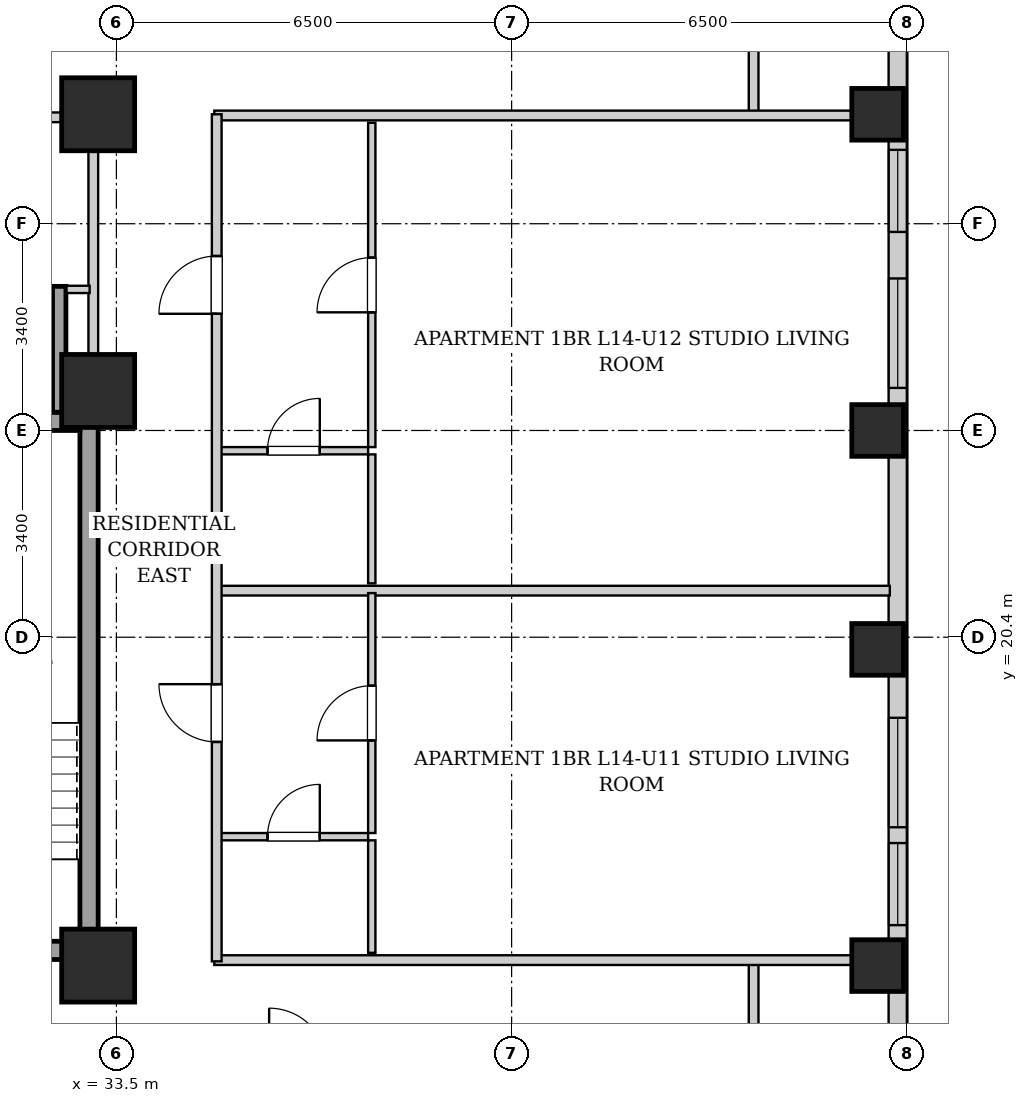
"""IFC4 building model, lengths in metres.
Left out: names, types, materials, properties, quantities, classifications, styles, units other than length and angle.
Written with IfcOpenShell. Run it as: python <this file> out.ifc"""

import sys

from ifc_helpers import new_model, si_unit, direction, frame, frame_2d, origin, origin_2d, place, context, subcontext, project, spatial, rectangle, extrude, element, fill, save


model = new_model("IFC4")
c1 = context("Model", 3, precision=1e-05, world=origin(), true_north=direction((0.0, 1.0)))
c2 = subcontext(c1, "Body", "Model", "MODEL_VIEW")
j1 = project(units=[si_unit("LENGTHUNIT", "METRE"), si_unit("PLANEANGLEUNIT", "RADIAN")], contexts=[c1])
p1 = place(None, origin())
s1 = spatial("IfcSite", under=j1, at=p1, CompositionType="ELEMENT")
p2 = place(p1, origin())
s2 = spatial("IfcBuilding", under=s1, at=p2, CompositionType="ELEMENT")
p3 = place(p2, frame((0.0, 0.0, 54.6)))
s3 = spatial("IfcBuildingStorey", under=s2, at=p3, CompositionType="ELEMENT", Elevation=54.6)
for number, where, z_axis, x_axis in (
    (1, (46.02, 15.0, 0.0), (0.0, 0.0, 1.0), (1.0, 0.0, 0.0)),
    (2, (46.02, 20.2, 0.0), (0.0, 0.0, 1.0), (1.0, 0.0, 0.0)),
    (3, (46.02, 23.8, 0.0), (0.0, 0.0, 1.0), (1.0, 0.0, 0.0)),
    (4, (46.02, 29.0, 0.0), (0.0, 0.0, 1.0), (1.0, 0.0, 0.0)),
):
    element("IfcColumn", number, at=place(p3, frame(where, z_axis=z_axis, x_axis=x_axis)), inside=s3, PredefinedType="COLUMN", context=c2, shape_type="SweptSolid", body=[
        extrude(rectangle(XDim=0.85, YDim=0.85, at=origin_2d()), origin(), (0.0, 0.0, 1.0), 3.2),
    ])
for number, where, z_axis, x_axis in (
    (5, (33.2, 15.0, 0.0), (0.0, 0.0, 1.0), (1.0, 0.0, 0.0)),
    (6, (33.2, 29.0, 0.0), (0.0, 0.0, 1.0), (1.0, 0.0, 0.0)),
    (7, (33.2, 24.45, 0.0), (0.0, 0.0, 1.0), (1.0, 0.0, 0.0)),
):
    element("IfcColumn", number, at=place(p3, frame(where, z_axis=z_axis, x_axis=x_axis)), inside=s3, PredefinedType="COLUMN", context=c2, shape_type="SweptSolid", body=[
        extrude(rectangle(XDim=1.2, YDim=1.2, at=origin_2d()), origin(), (0.0, 0.0, 1.0), 3.2),
    ])
p4 = place(p3, frame((46.35, 45.1, 0.0), z_axis=(0.0, 0.0, 1.0), x_axis=(0.0, -1.0, 0.0)))
e8 = element("IfcWall", 8, at=p4, inside=s3, PredefinedType="SOLIDWALL", context=c2, shape_type="SweptSolid", body=[
    extrude(rectangle(XDim=42.6, YDim=0.3, at=frame_2d((21.3, 0.0))), origin(), (0.0, 0.0, 1.0), 1.975),
])
p5 = place(p4, frame((37.575, 0.0, 0.55)))
e9 = element("IfcOpeningElement", 9, at=p5, cuts=e8, PredefinedType="OPENING", context=c2, shape_type="SweptSolid", body=[
    extrude(rectangle(XDim=1.8, YDim=1.2, at=frame_2d((0.9, 0.6))), frame((0.0, 0.16, 0.0), z_axis=(0.0, -1.0, 0.0), x_axis=(1.0, 0.0, 0.0)), (0.0, 0.0, 1.0), 0.32),
])
p6 = place(p4, frame((34.85, 0.0, 0.55)))
e10 = element("IfcOpeningElement", 10, at=p6, cuts=e8, PredefinedType="OPENING", context=c2, shape_type="SweptSolid", body=[
    extrude(rectangle(XDim=1.35, YDim=1.2, at=frame_2d((0.675, 0.6))), frame((0.0, 0.16, 0.0), z_axis=(0.0, -1.0, 0.0), x_axis=(1.0, 0.0, 0.0)), (0.0, 0.0, 1.0), 0.32),
])
p7 = place(p4, frame((3.715, 0.0, 0.55)))
e11 = element("IfcOpeningElement", 11, at=p7, cuts=e8, PredefinedType="OPENING", context=c2, shape_type="SweptSolid", body=[
    extrude(rectangle(XDim=1.8, YDim=1.2, at=frame_2d((0.9, 0.6))), frame((0.0, 0.16, 0.0), z_axis=(0.0, -1.0, 0.0), x_axis=(1.0, 0.0, 0.0)), (0.0, 0.0, 1.0), 0.32),
])
p8 = place(p4, frame((1.185, 0.0, 0.55)))
e12 = element("IfcOpeningElement", 12, at=p8, cuts=e8, PredefinedType="OPENING", context=c2, shape_type="SweptSolid", body=[
    extrude(rectangle(XDim=1.35, YDim=1.2, at=frame_2d((0.675, 0.6))), frame((0.0, 0.16, 0.0), z_axis=(0.0, -1.0, 0.0), x_axis=(1.0, 0.0, 0.0)), (0.0, 0.0, 1.0), 0.32),
])
p9 = place(p4, frame((26.025, 0.0, 0.55)))
e13 = element("IfcOpeningElement", 13, at=p9, cuts=e8, PredefinedType="OPENING", context=c2, shape_type="SweptSolid", body=[
    extrude(rectangle(XDim=1.8, YDim=1.2, at=frame_2d((0.9, 0.6))), frame((0.0, 0.16, 0.0), z_axis=(0.0, -1.0, 0.0), x_axis=(1.0, 0.0, 0.0)), (0.0, 0.0, 1.0), 0.32),
])
p10 = place(p4, frame((28.085, 0.0, 0.55)))
e14 = element("IfcOpeningElement", 14, at=p10, cuts=e8, PredefinedType="OPENING", context=c2, shape_type="SweptSolid", body=[
    extrude(rectangle(XDim=1.35, YDim=1.2, at=frame_2d((0.675, 0.6))), frame((0.0, 0.16, 0.0), z_axis=(0.0, -1.0, 0.0), x_axis=(1.0, 0.0, 0.0)), (0.0, 0.0, 1.0), 0.32),
])
p11 = place(p4, frame((18.8, 0.0, 0.55)))
e15 = element("IfcOpeningElement", 15, at=p11, cuts=e8, PredefinedType="OPENING", context=c2, shape_type="SweptSolid", body=[
    extrude(rectangle(XDim=1.8, YDim=1.2, at=frame_2d((0.9, 0.6))), frame((0.0, 0.16, 0.0), z_axis=(0.0, -1.0, 0.0), x_axis=(1.0, 0.0, 0.0)), (0.0, 0.0, 1.0), 0.32),
])
p12 = place(p4, frame((16.685, 0.0, 0.55)))
e16 = element("IfcOpeningElement", 16, at=p12, cuts=e8, PredefinedType="OPENING", context=c2, shape_type="SweptSolid", body=[
    extrude(rectangle(XDim=1.35, YDim=1.2, at=frame_2d((0.675, 0.6))), frame((0.0, 0.16, 0.0), z_axis=(0.0, -1.0, 0.0), x_axis=(1.0, 0.0, 0.0)), (0.0, 0.0, 1.0), 0.32),
])
p13 = place(p3, frame((33.05, 15.1, 0.0), z_axis=(0.0, 0.0, 1.0), x_axis=(0.0, 1.0, 0.0)))
e17 = element("IfcWall", 17, at=p13, inside=s3, PredefinedType="SHEAR", context=c2, shape_type="SweptSolid", body=[
    extrude(rectangle(XDim=9.0, YDim=0.3, at=frame_2d((4.5, 0.0))), origin(), (0.0, 0.0, 1.0), 2.94),
])
p14 = place(p3, frame((30.05, 23.95, 0.0), z_axis=(0.0, 0.0, 1.0), x_axis=(1.0, 0.0, 0.0)))
e18 = element("IfcWall", 18, at=p14, inside=s3, PredefinedType="SHEAR", context=c2, shape_type="SweptSolid", body=[
    extrude(rectangle(XDim=2.85, YDim=0.3, at=frame_2d((1.425, 0.0))), origin(), (0.0, 0.0, 1.0), 2.94),
])
p15 = place(p3, frame((30.05, 15.25, 0.0), z_axis=(0.0, 0.0, 1.0), x_axis=(1.0, 0.0, 0.0)))
e19 = element("IfcWall", 19, at=p15, inside=s3, PredefinedType="SHEAR", context=c2, shape_type="SweptSolid", body=[
    extrude(rectangle(XDim=2.85, YDim=0.3, at=frame_2d((1.425, 0.0))), origin(), (0.0, 0.0, 1.0), 2.94),
])
p16 = place(p15, frame((0.86, 0.0, 0.0)))
e20 = element("IfcOpeningElement", 20, at=p16, cuts=e19, PredefinedType="OPENING", context=c2, shape_type="SweptSolid", body=[
    extrude(rectangle(XDim=1.1, YDim=2.05, at=frame_2d((0.55, 1.025))), frame((0.0, 0.16, 0.0), z_axis=(0.0, -1.0, 0.0), x_axis=(1.0, 0.0, 0.0)), (0.0, 0.0, 1.0), 0.32),
])
p17 = place(p3, frame((32.56, 24.1, 0.0), z_axis=(0.0, 0.0, 1.0), x_axis=(0.0, 1.0, 0.0)))
e21 = element("IfcWall", 21, at=p17, inside=s3, PredefinedType="SHEAR", context=c2, shape_type="SweptSolid", body=[
    extrude(rectangle(XDim=2.07, YDim=0.22, at=frame_2d((1.035, 0.0))), origin(), (0.0, 0.0, 1.0), 2.94),
])
p18 = place(p3, frame((33.12, 24.12, 0.0), z_axis=(0.0, 0.0, 1.0), x_axis=(0.0, 1.0, 0.0)))
e22 = element("IfcWall", 22, at=p18, inside=s3, PredefinedType="PARTITIONING", context=c2, shape_type="SweptSolid", body=[
    extrude(rectangle(XDim=4.76, YDim=0.16, at=frame_2d((2.38, 0.0))), origin(), (0.0, 0.0, 1.0), 2.94),
])
p19 = place(p3, frame((32.68, 26.12, 0.0), z_axis=(0.0, 0.0, 1.0), x_axis=(1.0, 0.0, 0.0)))
e23 = element("IfcWall", 23, at=p19, inside=s3, PredefinedType="PARTITIONING", context=c2, shape_type="SweptSolid", body=[
    extrude(rectangle(XDim=0.38, YDim=0.12, at=frame_2d((0.19, 0.0))), origin(), (0.0, 0.0, 1.0), 2.94),
])
p20 = place(p3, frame((30.08, 28.95, 0.0), z_axis=(0.0, 0.0, 1.0), x_axis=(1.0, 0.0, 0.0)))
e24 = element("IfcWall", 24, at=p20, inside=s3, PredefinedType="PARTITIONING", context=c2, shape_type="SweptSolid", body=[
    extrude(rectangle(XDim=2.96, YDim=0.16, at=frame_2d((1.48, 0.0))), origin(), (0.0, 0.0, 1.0), 2.94),
])
p21 = place(p20, frame((0.695, 0.0, 0.0)))
e25 = element("IfcOpeningElement", 25, at=p21, cuts=e24, PredefinedType="OPENING", context=c2, shape_type="SweptSolid", body=[
    extrude(rectangle(XDim=0.86, YDim=2.05, at=frame_2d((0.43, 1.025))), frame((0.0, 0.09, 0.0), z_axis=(0.0, -1.0, 0.0), x_axis=(1.0, 0.0, 0.0)), (0.0, 0.0, 1.0), 0.18),
])
for number, where, z_axis, x_axis in (
    (26, (43.98, 13.35, 0.0), (0.0, 0.0, 1.0), (0.0, 1.0, 0.0)),
    (27, (43.98, 28.98, 0.0), (0.0, 0.0, 1.0), (0.0, 1.0, 0.0)),
):
    element("IfcWall", number, at=place(p3, frame(where, z_axis=z_axis, x_axis=x_axis)), inside=s3, PredefinedType="PARTITIONING", context=c2, shape_type="SweptSolid", body=[
        extrude(rectangle(XDim=1.74, YDim=0.16, at=frame_2d((0.87, 0.0))), origin(), (0.0, 0.0, 1.0), 2.94),
    ])
for number, where, z_axis, x_axis in (
    (28, (35.11, 15.09, 0.0), (0.0, 0.0, 1.0), (1.0, 0.0, 0.0)),
    (29, (35.11, 28.98, 0.0), (0.0, 0.0, 1.0), (1.0, 0.0, 0.0)),
):
    element("IfcWall", number, at=place(p3, frame(where, z_axis=z_axis, x_axis=x_axis)), inside=s3, PredefinedType="PARTITIONING", context=c2, shape_type="SweptSolid", body=[
        extrude(rectangle(XDim=11.11, YDim=0.16, at=frame_2d((5.555, 0.0))), origin(), (0.0, 0.0, 1.0), 2.232),
    ])
p22 = place(p3, frame((35.19, 21.166, 0.0), z_axis=(0.0, 0.0, 1.0), x_axis=(1.0, 0.0, 0.0)))
e30 = element("IfcWall", 30, at=p22, inside=s3, PredefinedType="PARTITIONING", context=c2, shape_type="SweptSolid", body=[
    extrude(rectangle(XDim=11.03, YDim=0.16, at=frame_2d((5.515, 0.0))), origin(), (0.0, 0.0, 1.0), 2.94),
])
p23 = place(p3, frame((35.19, 17.12, 0.0), z_axis=(0.0, 0.0, 1.0), x_axis=(1.0, 0.0, 0.0)))
e31 = element("IfcWall", 31, at=p23, inside=s3, PredefinedType="PARTITIONING", context=c2, shape_type="SweptSolid", body=[
    extrude(rectangle(XDim=2.45, YDim=0.12, at=frame_2d((1.225, 0.0))), origin(), (0.0, 0.0, 1.0), 2.94),
])
p24 = place(p23, frame((0.795, 0.0, 0.0)))
e32 = element("IfcOpeningElement", 32, at=p24, cuts=e31, PredefinedType="OPENING", context=c2, shape_type="SweptSolid", body=[
    extrude(rectangle(XDim=0.86, YDim=2.05, at=frame_2d((0.43, 1.025))), frame((0.0, 0.07, 0.0), z_axis=(0.0, -1.0, 0.0), x_axis=(1.0, 0.0, 0.0)), (0.0, 0.0, 1.0), 0.14),
])
p25 = place(p3, frame((37.7, 15.21, 0.0), z_axis=(0.0, 0.0, 1.0), x_axis=(0.0, 1.0, 0.0)))
e33 = element("IfcWall", 33, at=p25, inside=s3, PredefinedType="PARTITIONING", context=c2, shape_type="SweptSolid", body=[
    extrude(rectangle(XDim=1.85, YDim=0.12, at=frame_2d((0.925, 0.0))), origin(), (0.0, 0.0, 1.0), 2.94),
])
p26 = place(p3, frame((37.7, 17.18, 0.0), z_axis=(0.0, 0.0, 1.0), x_axis=(0.0, 1.0, 0.0)))
e34 = element("IfcWall", 34, at=p26, inside=s3, PredefinedType="PARTITIONING", context=c2, shape_type="SweptSolid", body=[
    extrude(rectangle(XDim=3.946, YDim=0.12, at=frame_2d((1.973, 0.0))), origin(), (0.0, 0.0, 1.0), 2.94),
])
p27 = place(p26, frame((1.523, 0.0, 0.0)))
e35 = element("IfcOpeningElement", 35, at=p27, cuts=e34, PredefinedType="OPENING", context=c2, shape_type="SweptSolid", body=[
    extrude(rectangle(XDim=0.9, YDim=2.05, at=frame_2d((0.45, 1.025))), frame((0.0, 0.07, 0.0), z_axis=(0.0, -1.0, 0.0), x_axis=(1.0, 0.0, 0.0)), (0.0, 0.0, 1.0), 0.14),
])
p28 = place(p3, frame((35.19, 23.467, 0.0), z_axis=(0.0, 0.0, 1.0), x_axis=(1.0, 0.0, 0.0)))
e36 = element("IfcWall", 36, at=p28, inside=s3, PredefinedType="PARTITIONING", context=c2, shape_type="SweptSolid", body=[
    extrude(rectangle(XDim=2.45, YDim=0.12, at=frame_2d((1.225, 0.0))), origin(), (0.0, 0.0, 1.0), 2.94),
])
p29 = place(p28, frame((0.795, 0.0, 0.0)))
e37 = element("IfcOpeningElement", 37, at=p29, cuts=e36, PredefinedType="OPENING", context=c2, shape_type="SweptSolid", body=[
    extrude(rectangle(XDim=0.86, YDim=2.05, at=frame_2d((0.43, 1.025))), frame((0.0, 0.07, 0.0), z_axis=(0.0, -1.0, 0.0), x_axis=(1.0, 0.0, 0.0)), (0.0, 0.0, 1.0), 0.14),
])
p30 = place(p3, frame((37.7, 21.286, 0.0), z_axis=(0.0, 0.0, 1.0), x_axis=(0.0, 1.0, 0.0)))
e38 = element("IfcWall", 38, at=p30, inside=s3, PredefinedType="PARTITIONING", context=c2, shape_type="SweptSolid", body=[
    extrude(rectangle(XDim=2.121, YDim=0.12, at=frame_2d((1.061, 0.0))), origin(), (0.0, 0.0, 1.0), 2.94),
])
p31 = place(p3, frame((37.7, 23.527, 0.0), z_axis=(0.0, 0.0, 1.0), x_axis=(0.0, 1.0, 0.0)))
e39 = element("IfcWall", 39, at=p31, inside=s3, PredefinedType="PARTITIONING", context=c2, shape_type="SweptSolid", body=[
    extrude(rectangle(XDim=5.333, YDim=0.12, at=frame_2d((2.667, 0.0))), origin(), (0.0, 0.0, 1.0), 2.94),
])
p32 = place(p31, frame((2.216, 0.0, 0.0)))
e40 = element("IfcOpeningElement", 40, at=p32, cuts=e39, PredefinedType="OPENING", context=c2, shape_type="SweptSolid", body=[
    extrude(rectangle(XDim=0.9, YDim=2.05, at=frame_2d((0.45, 1.025))), frame((0.0, 0.07, 0.0), z_axis=(0.0, -1.0, 0.0), x_axis=(1.0, 0.0, 0.0)), (0.0, 0.0, 1.0), 0.14),
])
p33 = place(p3, frame((35.15, 15.07, 0.0), z_axis=(0.0, 0.0, 1.0), x_axis=(0.0, 1.0, 0.0)))
e41 = element("IfcWall", 41, at=p33, inside=s3, PredefinedType="PARTITIONING", context=c2, shape_type="SweptSolid", body=[
    extrude(rectangle(XDim=13.93, YDim=0.16, at=frame_2d((6.965, 0.0))), origin(), (0.0, 0.0, 1.0), 2.94),
])
p34 = place(p33, frame((3.608, 0.0, 0.0)))
e42 = element("IfcOpeningElement", 42, at=p34, cuts=e41, PredefinedType="OPENING", context=c2, shape_type="SweptSolid", body=[
    extrude(rectangle(XDim=0.95, YDim=2.1, at=frame_2d((0.475, 1.05))), frame((0.0, 0.09, 0.0), z_axis=(0.0, -1.0, 0.0), x_axis=(1.0, 0.0, 0.0)), (0.0, 0.0, 1.0), 0.18),
])
p35 = place(p33, frame((10.649, 0.0, 0.0)))
e43 = element("IfcOpeningElement", 43, at=p35, cuts=e41, PredefinedType="OPENING", context=c2, shape_type="SweptSolid", body=[
    extrude(rectangle(XDim=0.95, YDim=2.1, at=frame_2d((0.475, 1.05))), frame((0.0, 0.09, 0.0), z_axis=(0.0, -1.0, 0.0), x_axis=(1.0, 0.0, 0.0)), (0.0, 0.0, 1.0), 0.18),
])
p36 = place(p24, origin())
e44 = element("IfcDoor", 44, at=p36, inside=s3, OperationType="SINGLE_SWING_RIGHT", PredefinedType="DOOR", context=c2, shape_type="SweptSolid", body=[
    extrude(rectangle(XDim=0.86, YDim=2.05, at=frame_2d((0.43, 1.025))), frame((0.0, 0.025, 0.0), z_axis=(0.0, -1.0, 0.0), x_axis=(1.0, 0.0, 0.0)), (0.0, 0.0, 1.0), 0.05),
])
fill(e32, e44)
p37 = place(p27, origin())
e45 = element("IfcDoor", 45, at=p37, inside=s3, OperationType="SINGLE_SWING_LEFT", PredefinedType="DOOR", context=c2, shape_type="SweptSolid", body=[
    extrude(rectangle(XDim=0.9, YDim=2.05, at=frame_2d((0.45, 1.025))), frame((0.0, 0.025, 0.0), z_axis=(0.0, -1.0, 0.0), x_axis=(1.0, 0.0, 0.0)), (0.0, 0.0, 1.0), 0.05),
])
fill(e35, e45)
p38 = place(p29, origin())
e46 = element("IfcDoor", 46, at=p38, inside=s3, OperationType="SINGLE_SWING_RIGHT", PredefinedType="DOOR", context=c2, shape_type="SweptSolid", body=[
    extrude(rectangle(XDim=0.86, YDim=2.05, at=frame_2d((0.43, 1.025))), frame((0.0, 0.025, 0.0), z_axis=(0.0, -1.0, 0.0), x_axis=(1.0, 0.0, 0.0)), (0.0, 0.0, 1.0), 0.05),
])
fill(e37, e46)
p39 = place(p32, origin())
e47 = element("IfcDoor", 47, at=p39, inside=s3, OperationType="SINGLE_SWING_LEFT", PredefinedType="DOOR", context=c2, shape_type="SweptSolid", body=[
    extrude(rectangle(XDim=0.9, YDim=2.05, at=frame_2d((0.45, 1.025))), frame((0.0, 0.025, 0.0), z_axis=(0.0, -1.0, 0.0), x_axis=(1.0, 0.0, 0.0)), (0.0, 0.0, 1.0), 0.05),
])
fill(e40, e47)
p40 = place(p34, origin())
e48 = element("IfcDoor", 48, at=p40, inside=s3, OperationType="SINGLE_SWING_RIGHT", PredefinedType="DOOR", context=c2, shape_type="SweptSolid", body=[
    extrude(rectangle(XDim=0.95, YDim=2.1, at=frame_2d((0.475, 1.05))), frame((0.0, 0.025, 0.0), z_axis=(0.0, -1.0, 0.0), x_axis=(1.0, 0.0, 0.0)), (0.0, 0.0, 1.0), 0.05),
])
fill(e42, e48)
p41 = place(p35, origin())
e49 = element("IfcDoor", 49, at=p41, inside=s3, OperationType="SINGLE_SWING_LEFT", PredefinedType="DOOR", context=c2, shape_type="SweptSolid", body=[
    extrude(rectangle(XDim=0.95, YDim=2.1, at=frame_2d((0.475, 1.05))), frame((0.0, 0.025, 0.0), z_axis=(0.0, -1.0, 0.0), x_axis=(1.0, 0.0, 0.0)), (0.0, 0.0, 1.0), 0.05),
])
fill(e43, e49)
p42 = place(p9, origin())
e50 = element("IfcWindow", 50, at=p42, inside=s3, PartitioningType="DOUBLE_PANEL_VERTICAL", PredefinedType="WINDOW", context=c2, shape_type="SweptSolid", body=[
    extrude(rectangle(XDim=1.8, YDim=1.2, at=frame_2d((0.9, 0.6))), frame((0.0, 0.03, 0.0), z_axis=(0.0, -1.0, 0.0), x_axis=(1.0, 0.0, 0.0)), (0.0, 0.0, 1.0), 0.06),
])
fill(e13, e50)
p43 = place(p10, origin())
e51 = element("IfcWindow", 51, at=p43, inside=s3, PartitioningType="SINGLE_PANEL", PredefinedType="WINDOW", context=c2, shape_type="SweptSolid", body=[
    extrude(rectangle(XDim=1.35, YDim=1.2, at=frame_2d((0.675, 0.6))), frame((0.0, 0.03, 0.0), z_axis=(0.0, -1.0, 0.0), x_axis=(1.0, 0.0, 0.0)), (0.0, 0.0, 1.0), 0.06),
])
fill(e14, e51)
p44 = place(p11, origin())
e52 = element("IfcWindow", 52, at=p44, inside=s3, PartitioningType="DOUBLE_PANEL_VERTICAL", PredefinedType="WINDOW", context=c2, shape_type="SweptSolid", body=[
    extrude(rectangle(XDim=1.8, YDim=1.2, at=frame_2d((0.9, 0.6))), frame((0.0, 0.03, 0.0), z_axis=(0.0, -1.0, 0.0), x_axis=(1.0, 0.0, 0.0)), (0.0, 0.0, 1.0), 0.06),
])
fill(e15, e52)
p45 = place(p12, origin())
e53 = element("IfcWindow", 53, at=p45, inside=s3, PartitioningType="SINGLE_PANEL", PredefinedType="WINDOW", context=c2, shape_type="SweptSolid", body=[
    extrude(rectangle(XDim=1.35, YDim=1.2, at=frame_2d((0.675, 0.6))), frame((0.0, 0.03, 0.0), z_axis=(0.0, -1.0, 0.0), x_axis=(1.0, 0.0, 0.0)), (0.0, 0.0, 1.0), 0.06),
])
fill(e16, e53)
save(model, sys.argv[1])
